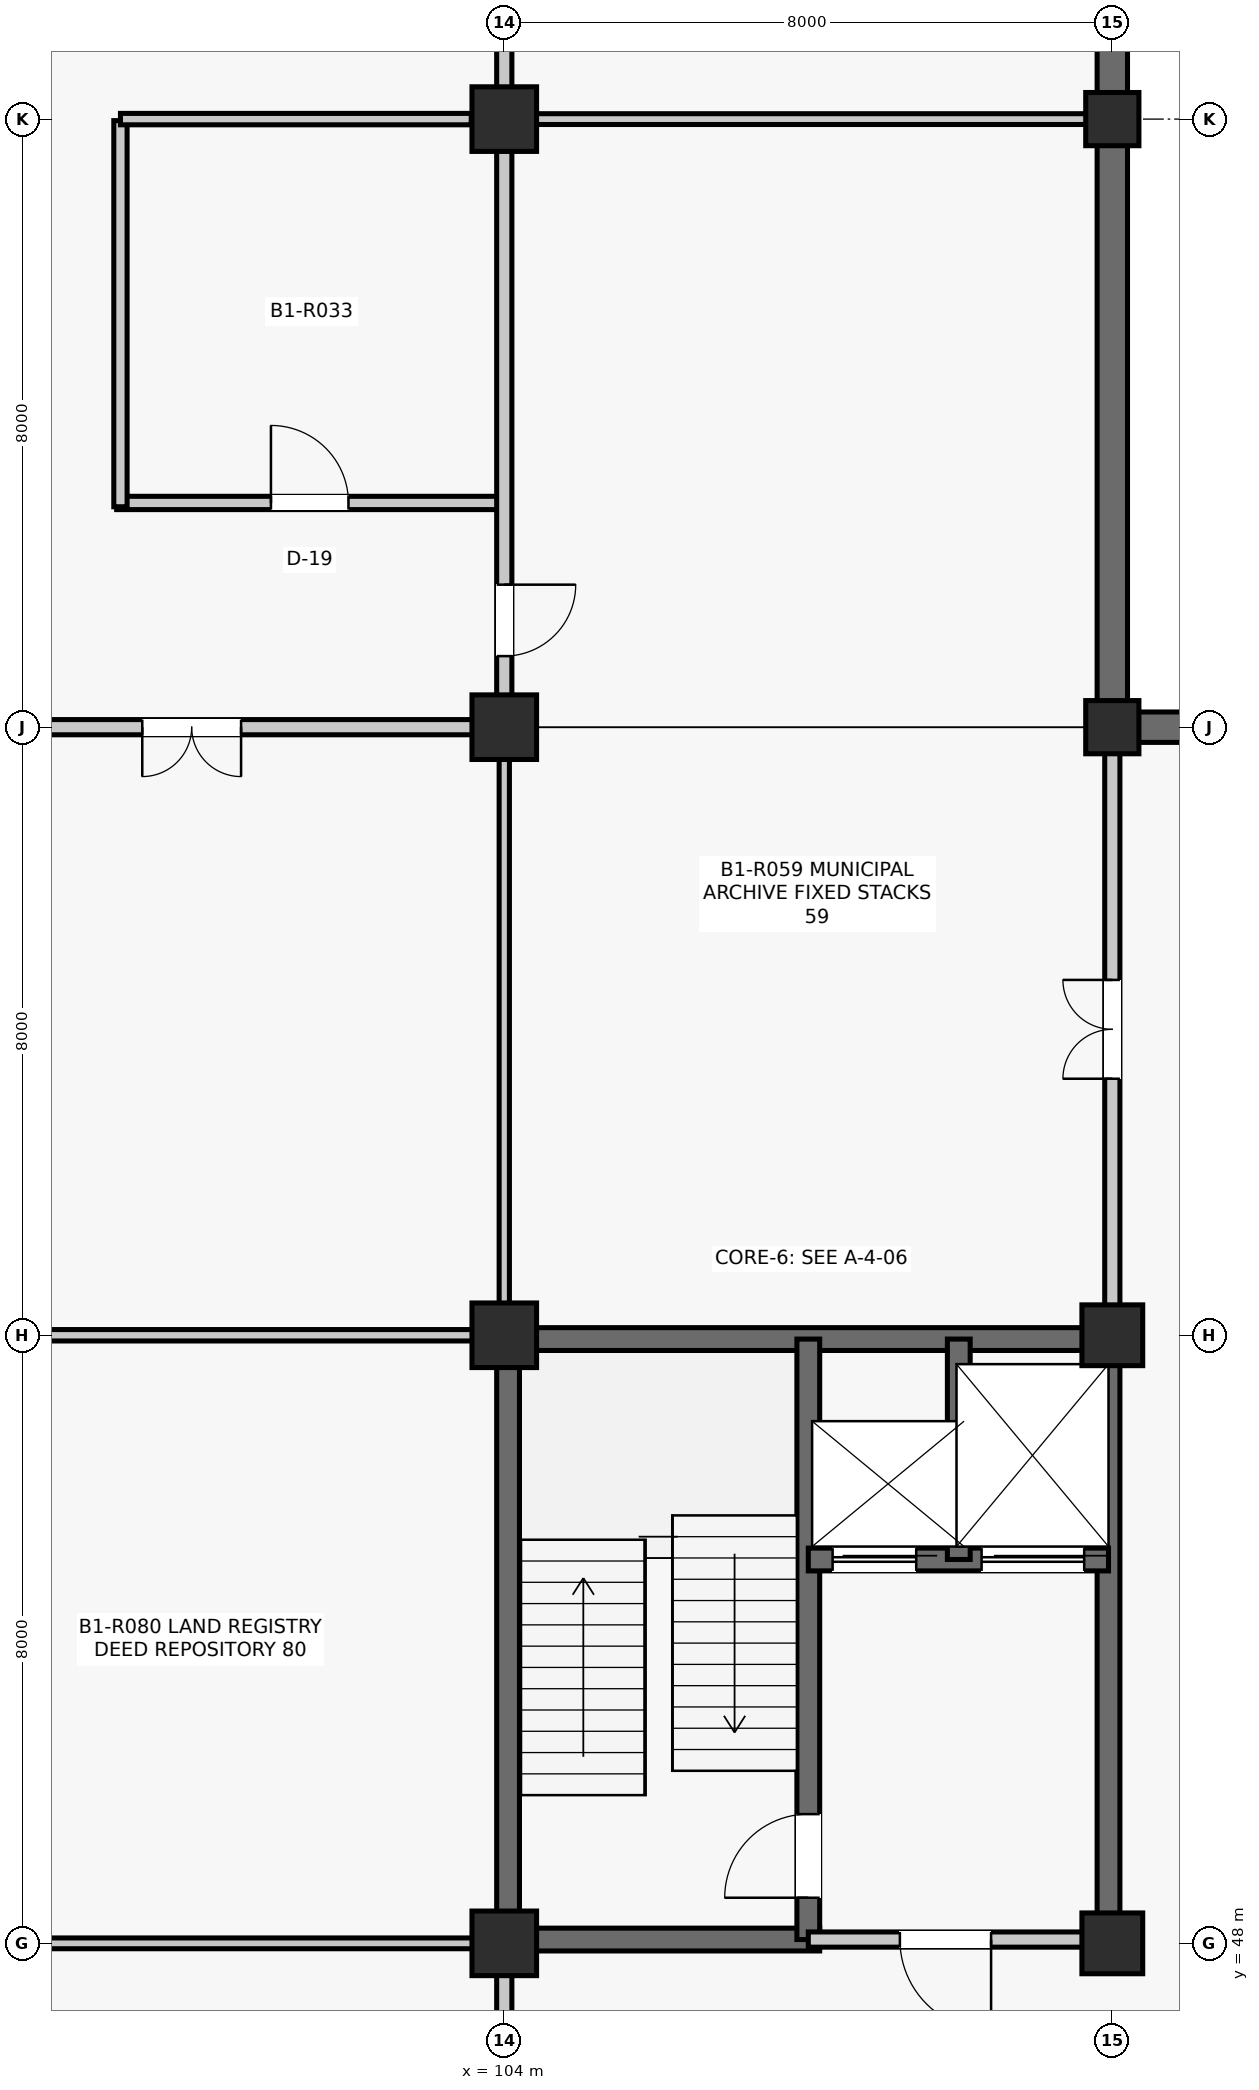
"""IFC4 building model, lengths in metres.
Left out: names, types, materials, properties, quantities, classifications, styles, units other than length and angle.
Written with IfcOpenShell. Run it as: python <this file> out.ifc"""

import sys

from ifc_helpers import new_model, si_unit, direction, frame, frame_2d, origin, origin_2d, place, context, subcontext, project, spatial, rectangle, extrude, element, fill, save


model = new_model("IFC4")
c1 = context("Model", 3, precision=1e-05, world=origin(), true_north=direction((0.0, 1.0)))
c2 = subcontext(c1, "Body", "Model", "MODEL_VIEW")
j1 = project(units=[si_unit("LENGTHUNIT", "METRE"), si_unit("PLANEANGLEUNIT", "RADIAN")], contexts=[c1])
p1 = place(None, origin())
s1 = spatial("IfcSite", under=j1, at=p1, CompositionType="ELEMENT")
p2 = place(p1, origin())
s2 = spatial("IfcBuilding", under=s1, at=p2, CompositionType="ELEMENT")
p3 = place(p2, frame((0.0, 0.0, -4.29)))
s3 = spatial("IfcBuildingStorey", under=s2, at=p3, CompositionType="ELEMENT", Elevation=-4.29)
for number, where, z_axis, x_axis in (
    (1, (104.0, 48.0, 0.0), (0.0, 0.0, 1.0), (1.0, 0.0, 0.0)),
    (2, (104.0, 56.0, 0.0), (0.0, 0.0, 1.0), (1.0, 0.0, 0.0)),
    (3, (104.0, 64.0, 0.0), (0.0, 0.0, 1.0), (1.0, 0.0, 0.0)),
    (4, (104.0, 72.0, 0.0), (0.0, 0.0, 1.0), (1.0, 0.0, 0.0)),
):
    element("IfcColumn", number, at=place(p3, frame(where, z_axis=z_axis, x_axis=x_axis)), inside=s3, PredefinedType="COLUMN", context=c2, shape_type="SweptSolid", body=[
        extrude(rectangle(XDim=0.85, YDim=0.85, at=origin_2d()), origin(), (0.0, 0.0, 1.0), 4.29),
    ])
for number, where, z_axis, x_axis in (
    (5, (112.0, 48.0, 0.0), (0.0, 0.0, 1.0), (1.0, 0.0, 0.0)),
    (6, (112.0, 56.0, 0.0), (0.0, 0.0, 1.0), (1.0, 0.0, 0.0)),
):
    element("IfcColumn", number, at=place(p3, frame(where, z_axis=z_axis, x_axis=x_axis)), inside=s3, PredefinedType="COLUMN", context=c2, shape_type="SweptSolid", body=[
        extrude(rectangle(XDim=0.8, YDim=0.8, at=origin_2d()), origin(), (0.0, 0.0, 1.0), 4.29),
    ])
for number, where, z_axis, x_axis in (
    (7, (112.0, 64.0, 0.0), (0.0, 0.0, 1.0), (1.0, 0.0, 0.0)),
    (8, (112.0, 72.0, 0.0), (0.0, 0.0, 1.0), (1.0, 0.0, 0.0)),
):
    element("IfcColumn", number, at=place(p3, frame(where, z_axis=z_axis, x_axis=x_axis)), inside=s3, PredefinedType="COLUMN", context=c2, shape_type="SweptSolid", body=[
        extrude(rectangle(XDim=0.7, YDim=0.7, at=origin_2d()), origin(), (0.0, 0.0, 1.0), 4.29),
    ])
p4 = place(p3, frame((112.0, 64.335, 0.0), z_axis=(0.0, 0.0, 1.0), x_axis=(0.0, 1.0, 0.0)))
e9 = element("IfcWall", 9, at=p4, inside=s3, PredefinedType="SHEAR", context=c2, shape_type="SweptSolid", body=[
    extrude(rectangle(XDim=7.33, YDim=0.4, at=frame_2d((3.665, 0.0))), origin(), (0.0, 0.0, 1.0), 3.401),
])
p5 = place(p3, frame((112.0, 72.335, 0.0), z_axis=(0.0, 0.0, 1.0), x_axis=(0.0, 1.0, 0.0)))
e10 = element("IfcWall", 10, at=p5, inside=s3, PredefinedType="SHEAR", context=c2, shape_type="SweptSolid", body=[
    extrude(rectangle(XDim=7.33, YDim=0.4, at=frame_2d((3.665, 0.0))), origin(), (0.0, 0.0, 1.0), 3.468),
])
p6 = place(p3, frame((112.335, 64.0, 0.0), z_axis=(0.0, 0.0, 1.0), x_axis=(1.0, 0.0, 0.0)))
e11 = element("IfcWall", 11, at=p6, inside=s3, PredefinedType="SHEAR", context=c2, shape_type="SweptSolid", body=[
    extrude(rectangle(XDim=7.33, YDim=0.4, at=frame_2d((3.665, 0.0))), origin(), (0.0, 0.0, 1.0), 3.333),
])
p7 = place(p3, frame((104.05, 48.315, 0.0), z_axis=(0.0, 0.0, 1.0), x_axis=(0.0, 1.0, 0.0)))
e12 = element("IfcWall", 12, at=p7, inside=s3, PredefinedType="SHEAR", context=c2, shape_type="SweptSolid", body=[
    extrude(rectangle(XDim=7.37, YDim=0.3, at=frame_2d((3.685, 0.0))), origin(), (0.0, 0.0, 1.0), 4.015),
])
p8 = place(p3, frame((104.315, 55.95, 0.0), z_axis=(0.0, 0.0, 1.0), x_axis=(1.0, 0.0, 0.0)))
e13 = element("IfcWall", 13, at=p8, inside=s3, PredefinedType="SHEAR", context=c2, shape_type="SweptSolid", body=[
    extrude(rectangle(XDim=7.395, YDim=0.3, at=frame_2d((3.698, 0.0))), origin(), (0.0, 0.0, 1.0), 4.015),
])
p9 = place(p3, frame((111.95, 48.29, 0.0), z_axis=(0.0, 0.0, 1.0), x_axis=(0.0, 1.0, 0.0)))
e14 = element("IfcWall", 14, at=p9, inside=s3, PredefinedType="SHEAR", context=c2, shape_type="SweptSolid", body=[
    extrude(rectangle(XDim=7.42, YDim=0.3, at=frame_2d((3.71, 0.0))), origin(), (0.0, 0.0, 1.0), 4.015),
])
p10 = place(p3, frame((104.315, 48.05, 0.0), z_axis=(0.0, 0.0, 1.0), x_axis=(1.0, 0.0, 0.0)))
e15 = element("IfcWall", 15, at=p10, inside=s3, PredefinedType="SHEAR", context=c2, shape_type="SweptSolid", body=[
    extrude(rectangle(XDim=3.835, YDim=0.3, at=frame_2d((1.917, 0.0))), origin(), (0.0, 0.0, 1.0), 4.015),
])
p11 = place(p3, frame((108.0, 48.05, 0.0), z_axis=(0.0, 0.0, 1.0), x_axis=(0.0, 1.0, 0.0)))
e16 = element("IfcWall", 16, at=p11, inside=s3, PredefinedType="SHEAR", context=c2, shape_type="SweptSolid", body=[
    extrude(rectangle(XDim=7.9, YDim=0.3, at=frame_2d((3.95, 0.0))), origin(), (0.0, 0.0, 1.0), 4.015),
])
p12 = place(p11, frame((0.55, 0.0, 0.0)))
e17 = element("IfcOpeningElement", 17, at=p12, cuts=e16, PredefinedType="OPENING", context=c2, shape_type="SweptSolid", body=[
    extrude(rectangle(XDim=1.1, YDim=2.15, at=frame_2d((0.55, 1.075))), frame((0.0, 0.16, 0.0), z_axis=(0.0, -1.0, 0.0), x_axis=(1.0, 0.0, 0.0)), (0.0, 0.0, 1.0), 0.32),
])
p13 = place(p3, frame((108.0, 53.05, 0.0), z_axis=(0.0, 0.0, 1.0), x_axis=(1.0, 0.0, 0.0)))
e18 = element("IfcWall", 18, at=p13, inside=s3, PredefinedType="SHEAR", context=c2, shape_type="SweptSolid", body=[
    extrude(rectangle(XDim=3.95, YDim=0.3, at=frame_2d((1.975, 0.0))), origin(), (0.0, 0.0, 1.0), 4.015),
])
p14 = place(p13, frame((0.32, 0.0, 0.0)))
e19 = element("IfcOpeningElement", 19, at=p14, cuts=e18, PredefinedType="OPENING", context=c2, shape_type="SweptSolid", body=[
    extrude(rectangle(XDim=1.1, YDim=2.2, at=frame_2d((0.55, 1.1))), frame((0.0, 0.16, 0.0), z_axis=(0.0, -1.0, 0.0), x_axis=(1.0, 0.0, 0.0)), (0.0, 0.0, 1.0), 0.32),
])
p15 = place(p13, frame((2.28, 0.0, 0.0)))
e20 = element("IfcOpeningElement", 20, at=p15, cuts=e18, PredefinedType="OPENING", context=c2, shape_type="SweptSolid", body=[
    extrude(rectangle(XDim=1.35, YDim=2.3, at=frame_2d((0.675, 1.15))), frame((0.0, 0.16, 0.0), z_axis=(0.0, -1.0, 0.0), x_axis=(1.0, 0.0, 0.0)), (0.0, 0.0, 1.0), 0.32),
])
p16 = place(p3, frame((109.98, 53.05, 0.0), z_axis=(0.0, 0.0, 1.0), x_axis=(0.0, 1.0, 0.0)))
e21 = element("IfcWall", 21, at=p16, inside=s3, PredefinedType="SHEAR", context=c2, shape_type="SweptSolid", body=[
    extrude(rectangle(XDim=2.9, YDim=0.3, at=frame_2d((1.45, 0.0))), origin(), (0.0, 0.0, 1.0), 4.015),
])
p17 = place(p3, frame((108.0, 48.05, 0.0), z_axis=(0.0, 0.0, 1.0), x_axis=(1.0, 0.0, 0.0)))
e22 = element("IfcWall", 22, at=p17, inside=s3, PredefinedType="PARTITIONING", context=c2, shape_type="SweptSolid", body=[
    extrude(rectangle(XDim=3.61, YDim=0.2, at=frame_2d((1.805, 0.0))), origin(), (0.0, 0.0, 1.0), 3.394),
])
p18 = place(p17, frame((1.205, 0.0, 0.0)))
e23 = element("IfcOpeningElement", 23, at=p18, cuts=e22, PredefinedType="OPENING", context=c2, shape_type="SweptSolid", body=[
    extrude(rectangle(XDim=1.2, YDim=2.15, at=frame_2d((0.6, 1.075))), frame((0.0, 0.11, 0.0), z_axis=(0.0, -1.0, 0.0), x_axis=(1.0, 0.0, 0.0)), (0.0, 0.0, 1.0), 0.22),
])
p19 = place(p3, frame((98.9, 66.95, 0.0), z_axis=(0.0, 0.0, 1.0), x_axis=(1.0, 0.0, 0.0)))
e24 = element("IfcWall", 24, at=p19, inside=s3, PredefinedType="PARTITIONING", context=c2, shape_type="SweptSolid", body=[
    extrude(rectangle(XDim=5.08, YDim=0.175, at=frame_2d((2.54, 0.0))), origin(), (0.0, 0.0, 1.0), 3.402),
])
p20 = place(p19, frame((2.03, 0.0, 0.0)))
e25 = element("IfcOpeningElement", 25, at=p20, cuts=e24, PredefinedType="OPENING", context=c2, shape_type="SweptSolid", body=[
    extrude(rectangle(XDim=1.02, YDim=2.2, at=frame_2d((0.51, 1.1))), frame((0.0, 0.097, 0.0), z_axis=(0.0, -1.0, 0.0), x_axis=(1.0, 0.0, 0.0)), (0.0, 0.0, 1.0), 0.195),
])
p21 = place(p3, frame((98.95, 66.9, 0.0), z_axis=(0.0, 0.0, 1.0), x_axis=(0.0, 1.0, 0.0)))
e26 = element("IfcWall", 26, at=p21, inside=s3, PredefinedType="PARTITIONING", context=c2, shape_type="SweptSolid", body=[
    extrude(rectangle(XDim=5.08, YDim=0.175, at=frame_2d((2.54, 0.0))), origin(), (0.0, 0.0, 1.0), 3.393),
])
p22 = place(p3, frame((98.95, 72.0, 0.0), z_axis=(0.0, 0.0, 1.0), x_axis=(1.0, 0.0, 0.0)))
e27 = element("IfcWall", 27, at=p22, inside=s3, PredefinedType="PARTITIONING", context=c2, shape_type="SweptSolid", body=[
    extrude(rectangle(XDim=4.615, YDim=0.15, at=frame_2d((2.308, 0.0))), origin(), (0.0, 0.0, 1.0), 3.393),
])
p23 = place(p3, frame((104.0, 40.415, 0.0), z_axis=(0.0, 0.0, 1.0), x_axis=(0.0, 1.0, 0.0)))
e28 = element("IfcWall", 28, at=p23, inside=s3, PredefinedType="PARTITIONING", context=c2, shape_type="SweptSolid", body=[
    extrude(rectangle(XDim=7.17, YDim=0.2, at=frame_2d((3.585, 0.0))), origin(), (0.0, 0.0, 1.0), 3.394),
])
p24 = place(p23, frame((2.935, 0.0, 0.0)))
e29 = element("IfcOpeningElement", 29, at=p24, cuts=e28, PredefinedType="OPENING", context=c2, shape_type="SweptSolid", body=[
    extrude(rectangle(XDim=1.3, YDim=2.2, at=frame_2d((0.65, 1.1))), frame((0.0, 0.11, 0.0), z_axis=(0.0, -1.0, 0.0), x_axis=(1.0, 0.0, 0.0)), (0.0, 0.0, 1.0), 0.22),
])
p25 = place(p3, frame((96.189, 48.0, 0.0), z_axis=(0.0, 0.0, 1.0), x_axis=(1.0, 0.0, 0.0)))
e30 = element("IfcWall", 30, at=p25, inside=s3, PredefinedType="PARTITIONING", context=c2, shape_type="SweptSolid", body=[
    extrude(rectangle(XDim=7.396, YDim=0.142, at=frame_2d((3.698, 0.0))), origin(), (0.0, 0.0, 1.0), 3.326),
])
p26 = place(p3, frame((96.189, 56.0, 0.0), z_axis=(0.0, 0.0, 1.0), x_axis=(1.0, 0.0, 0.0)))
e31 = element("IfcWall", 31, at=p26, inside=s3, PredefinedType="PARTITIONING", context=c2, shape_type="SweptSolid", body=[
    extrude(rectangle(XDim=7.396, YDim=0.15, at=frame_2d((3.698, 0.0))), origin(), (0.0, 0.0, 1.0), 3.394),
])
p27 = place(p3, frame((104.0, 56.415, 0.0), z_axis=(0.0, 0.0, 1.0), x_axis=(0.0, 1.0, 0.0)))
e32 = element("IfcWall", 32, at=p27, inside=s3, PredefinedType="PARTITIONING", context=c2, shape_type="SweptSolid", body=[
    extrude(rectangle(XDim=7.17, YDim=0.135, at=frame_2d((3.585, 0.0))), origin(), (0.0, 0.0, 1.0), 3.393),
])
p28 = place(p3, frame((96.189, 64.0, 0.0), z_axis=(0.0, 0.0, 1.0), x_axis=(1.0, 0.0, 0.0)))
e33 = element("IfcWall", 33, at=p28, inside=s3, PredefinedType="PARTITIONING", context=c2, shape_type="SweptSolid", body=[
    extrude(rectangle(XDim=7.396, YDim=0.2, at=frame_2d((3.698, 0.0))), origin(), (0.0, 0.0, 1.0), 3.317),
])
p29 = place(p28, frame((3.048, 0.0, 0.0)))
e34 = element("IfcOpeningElement", 34, at=p29, cuts=e33, PredefinedType="OPENING", context=c2, shape_type="SweptSolid", body=[
    extrude(rectangle(XDim=1.3, YDim=2.2, at=frame_2d((0.65, 1.1))), frame((0.0, 0.11, 0.0), z_axis=(0.0, -1.0, 0.0), x_axis=(1.0, 0.0, 0.0)), (0.0, 0.0, 1.0), 0.22),
])
p30 = place(p3, frame((104.0, 64.415, 0.0), z_axis=(0.0, 0.0, 1.0), x_axis=(0.0, 1.0, 0.0)))
e35 = element("IfcWall", 35, at=p30, inside=s3, PredefinedType="PARTITIONING", context=c2, shape_type="SweptSolid", body=[
    extrude(rectangle(XDim=7.17, YDim=0.2, at=frame_2d((3.585, 0.0))), origin(), (0.0, 0.0, 1.0), 3.402),
])
p31 = place(p30, frame((0.52, 0.0, 0.0)))
e36 = element("IfcOpeningElement", 36, at=p31, cuts=e35, PredefinedType="OPENING", context=c2, shape_type="SweptSolid", body=[
    extrude(rectangle(XDim=0.94, YDim=2.12, at=frame_2d((0.47, 1.06))), frame((0.0, 0.11, 0.0), z_axis=(0.0, -1.0, 0.0), x_axis=(1.0, 0.0, 0.0)), (0.0, 0.0, 1.0), 0.22),
])
p32 = place(p3, frame((104.0, 72.415, 0.0), z_axis=(0.0, 0.0, 1.0), x_axis=(0.0, 1.0, 0.0)))
e37 = element("IfcWall", 37, at=p32, inside=s3, PredefinedType="PARTITIONING", context=c2, shape_type="SweptSolid", body=[
    extrude(rectangle(XDim=7.17, YDim=0.2, at=frame_2d((3.585, 0.0))), origin(), (0.0, 0.0, 1.0), 3.394),
])
p33 = place(p32, frame((0.52, 0.0, 0.0)))
e38 = element("IfcOpeningElement", 38, at=p33, cuts=e37, PredefinedType="OPENING", context=c2, shape_type="SweptSolid", body=[
    extrude(rectangle(XDim=0.94, YDim=2.12, at=frame_2d((0.47, 1.06))), frame((0.0, 0.11, 0.0), z_axis=(0.0, -1.0, 0.0), x_axis=(1.0, 0.0, 0.0)), (0.0, 0.0, 1.0), 0.22),
])
p34 = place(p3, frame((112.0, 56.39, 0.0), z_axis=(0.0, 0.0, 1.0), x_axis=(0.0, 1.0, 0.0)))
e39 = element("IfcWall", 39, at=p34, inside=s3, PredefinedType="PARTITIONING", context=c2, shape_type="SweptSolid", body=[
    extrude(rectangle(XDim=7.27, YDim=0.2, at=frame_2d((3.635, 0.0))), origin(), (0.0, 0.0, 1.0), 3.402),
])
p35 = place(p34, frame((2.985, 0.0, 0.0)))
e40 = element("IfcOpeningElement", 40, at=p35, cuts=e39, PredefinedType="OPENING", context=c2, shape_type="SweptSolid", body=[
    extrude(rectangle(XDim=1.3, YDim=2.2, at=frame_2d((0.65, 1.1))), frame((0.0, 0.11, 0.0), z_axis=(0.0, -1.0, 0.0), x_axis=(1.0, 0.0, 0.0)), (0.0, 0.0, 1.0), 0.22),
])
p36 = place(p3, frame((104.415, 72.0, 0.0), z_axis=(0.0, 0.0, 1.0), x_axis=(1.0, 0.0, 0.0)))
e41 = element("IfcWall", 41, at=p36, inside=s3, PredefinedType="PARTITIONING", context=c2, shape_type="SweptSolid", body=[
    extrude(rectangle(XDim=7.245, YDim=0.142, at=frame_2d((3.623, 0.0))), origin(), (0.0, 0.0, 1.0), 3.326),
])
p37 = place(p12, origin())
e42 = element("IfcDoor", 42, at=p37, inside=s3, OperationType="SINGLE_SWING_LEFT", PredefinedType="DOOR", context=c2, shape_type="SweptSolid", body=[
    extrude(rectangle(XDim=1.1, YDim=2.15, at=frame_2d((0.55, 1.075))), frame((0.0, 0.025, 0.0), z_axis=(0.0, -1.0, 0.0), x_axis=(1.0, 0.0, 0.0)), (0.0, 0.0, 1.0), 0.05),
])
fill(e17, e42)
p38 = place(p14, origin())
e43 = element("IfcDoor", 43, at=p38, inside=s3, OperationType="SLIDING_TO_LEFT", PredefinedType="DOOR", context=c2, shape_type="SweptSolid", body=[
    extrude(rectangle(XDim=1.1, YDim=2.2, at=frame_2d((0.55, 1.1))), frame((0.0, 0.025, 0.0), z_axis=(0.0, -1.0, 0.0), x_axis=(1.0, 0.0, 0.0)), (0.0, 0.0, 1.0), 0.05),
])
fill(e19, e43)
p39 = place(p15, origin())
e44 = element("IfcDoor", 44, at=p39, inside=s3, OperationType="DOUBLE_DOOR_SLIDING", PredefinedType="DOOR", context=c2, shape_type="SweptSolid", body=[
    extrude(rectangle(XDim=1.35, YDim=2.3, at=frame_2d((0.675, 1.15))), frame((0.0, 0.025, 0.0), z_axis=(0.0, -1.0, 0.0), x_axis=(1.0, 0.0, 0.0)), (0.0, 0.0, 1.0), 0.05),
])
fill(e20, e44)
p40 = place(p18, frame((1.2, 0.0, 0.0), z_axis=(0.0, 0.0, 1.0), x_axis=(-1.0, 0.0, 0.0)))
e45 = element("IfcDoor", 45, at=p40, inside=s3, OperationType="SINGLE_SWING_RIGHT", PredefinedType="DOOR", context=c2, shape_type="SweptSolid", body=[
    extrude(rectangle(XDim=1.2, YDim=2.15, at=frame_2d((0.6, 1.075))), frame((0.0, 0.025, 0.0), z_axis=(0.0, -1.0, 0.0), x_axis=(1.0, 0.0, 0.0)), (0.0, 0.0, 1.0), 0.05),
])
fill(e23, e45)
p41 = place(p20, origin())
e46 = element("IfcDoor", 46, at=p41, inside=s3, OperationType="SINGLE_SWING_LEFT", PredefinedType="DOOR", context=c2, shape_type="SweptSolid", body=[
    extrude(rectangle(XDim=1.02, YDim=2.2, at=frame_2d((0.51, 1.1))), frame((0.0, 0.025, 0.0), z_axis=(0.0, -1.0, 0.0), x_axis=(1.0, 0.0, 0.0)), (0.0, 0.0, 1.0), 0.05),
])
fill(e25, e46)
p42 = place(p29, frame((1.3, 0.0, 0.0), z_axis=(0.0, 0.0, 1.0), x_axis=(-1.0, 0.0, 0.0)))
e47 = element("IfcDoor", 47, at=p42, inside=s3, OperationType="DOUBLE_DOOR_SINGLE_SWING", PredefinedType="DOOR", context=c2, shape_type="SweptSolid", body=[
    extrude(rectangle(XDim=1.3, YDim=2.2, at=frame_2d((0.65, 1.1))), frame((0.0, 0.025, 0.0), z_axis=(0.0, -1.0, 0.0), x_axis=(1.0, 0.0, 0.0)), (0.0, 0.0, 1.0), 0.05),
])
fill(e34, e47)
p43 = place(p31, frame((0.94, 0.0, 0.0), z_axis=(0.0, 0.0, 1.0), x_axis=(-1.0, 0.0, 0.0)))
e48 = element("IfcDoor", 48, at=p43, inside=s3, OperationType="SINGLE_SWING_RIGHT", PredefinedType="DOOR", context=c2, shape_type="SweptSolid", body=[
    extrude(rectangle(XDim=0.94, YDim=2.12, at=frame_2d((0.47, 1.06))), frame((0.0, 0.025, 0.0), z_axis=(0.0, -1.0, 0.0), x_axis=(1.0, 0.0, 0.0)), (0.0, 0.0, 1.0), 0.05),
])
fill(e36, e48)
p44 = place(p35, origin())
e49 = element("IfcDoor", 49, at=p44, inside=s3, OperationType="DOUBLE_DOOR_SINGLE_SWING", PredefinedType="DOOR", context=c2, shape_type="SweptSolid", body=[
    extrude(rectangle(XDim=1.3, YDim=2.2, at=frame_2d((0.65, 1.1))), frame((0.0, 0.025, 0.0), z_axis=(0.0, -1.0, 0.0), x_axis=(1.0, 0.0, 0.0)), (0.0, 0.0, 1.0), 0.05),
])
fill(e40, e49)
save(model, sys.argv[1])
